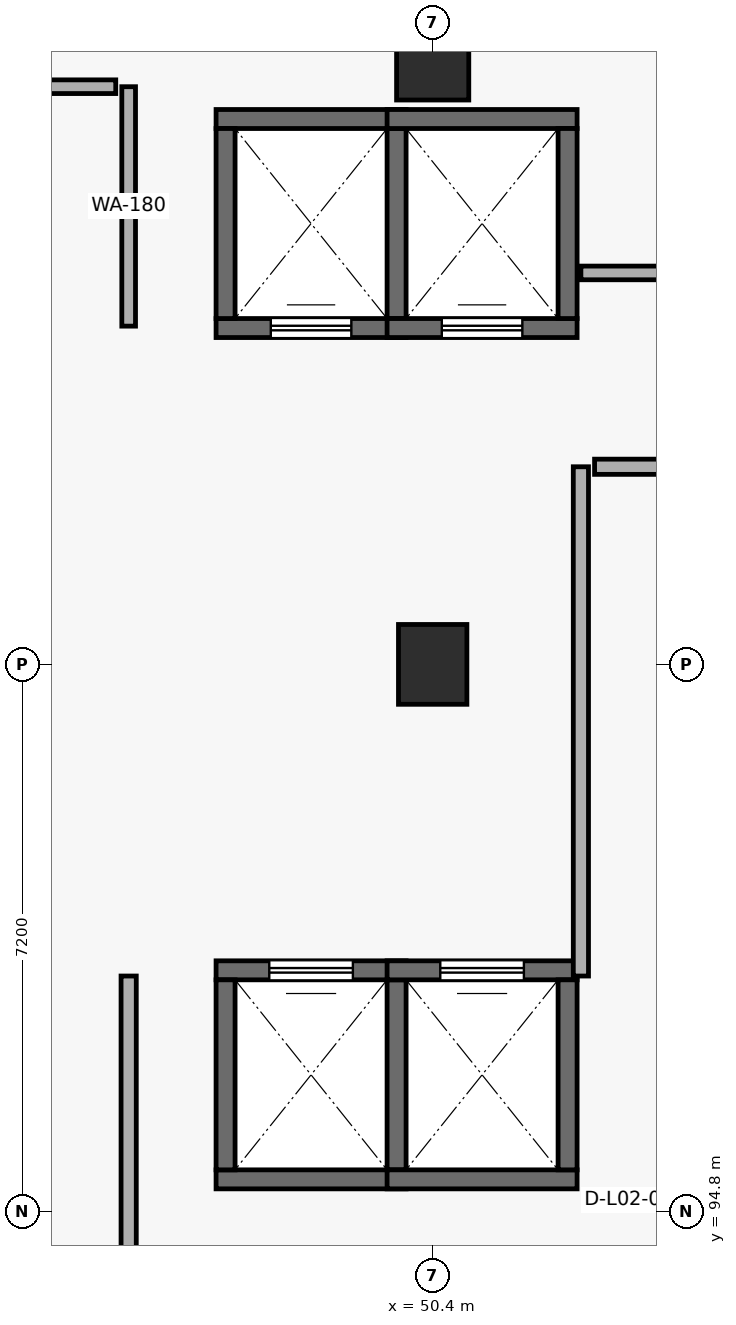
"""IFC4 building model, lengths in metres.
Left out: names, types, materials, properties, quantities, classifications, styles, units other than length and angle.
Written with IfcOpenShell. Run it as: python <this file> out.ifc"""

import sys

from ifc_helpers import new_model, si_unit, direction, frame, frame_2d, origin, origin_2d, place, context, subcontext, project, spatial, rectangle, extrude, element, fill, save


model = new_model("IFC4")
c1 = context("Model", 3, precision=1e-05, world=origin(), true_north=direction((0.0, 1.0)))
c2 = subcontext(c1, "Body", "Model", "MODEL_VIEW")
j1 = project(units=[si_unit("LENGTHUNIT", "METRE"), si_unit("PLANEANGLEUNIT", "RADIAN")], contexts=[c1])
p1 = place(None, origin())
s1 = spatial("IfcSite", under=j1, at=p1, CompositionType="ELEMENT")
p2 = place(p1, origin())
s2 = spatial("IfcBuilding", under=s1, at=p2, CompositionType="ELEMENT")
p3 = place(p2, frame((0.0, 0.0, 5.4)))
s3 = spatial("IfcBuildingStorey", under=s2, at=p3, CompositionType="ELEMENT", Elevation=5.4)
p4 = place(p3, frame((50.4, 102.0, 0.0), z_axis=(0.0, 0.0, 1.0), x_axis=(1.0, 0.0, 0.0)))
e1 = element("IfcColumn", 1, at=p4, inside=s3, PredefinedType="COLUMN", context=c2, shape_type="SweptSolid", body=[
    extrude(rectangle(XDim=0.9, YDim=1.05, at=origin_2d()), origin(), (0.0, 0.0, 1.0), 4.8),
])
p5 = place(p3, frame((50.4, 109.9, 0.0), z_axis=(0.0, 0.0, 1.0), x_axis=(1.0, 0.0, 0.0)))
e2 = element("IfcColumn", 2, at=p5, inside=s3, PredefinedType="COLUMN", context=c2, shape_type="SweptSolid", body=[
    extrude(rectangle(XDim=0.95, YDim=0.95, at=origin_2d()), origin(), (0.0, 0.0, 1.0), 4.8),
])
p6 = place(p3, frame((47.55, 95.225, 0.0), z_axis=(0.0, 0.0, 1.0), x_axis=(1.0, 0.0, 0.0)))
e3 = element("IfcWall", 3, at=p6, inside=s3, PredefinedType="SHEAR", context=c2, shape_type="SweptSolid", body=[
    extrude(rectangle(XDim=2.5, YDim=0.25, at=frame_2d((1.25, 0.0))), origin(), (0.0, 0.0, 1.0), 4.52),
])
p7 = place(p3, frame((50.05, 97.975, 0.0), z_axis=(0.0, 0.0, 1.0), x_axis=(-1.0, 0.0, 0.0)))
e4 = element("IfcWall", 4, at=p7, inside=s3, PredefinedType="SHEAR", context=c2, shape_type="SweptSolid", body=[
    extrude(rectangle(XDim=2.5, YDim=0.25, at=frame_2d((1.25, 0.0))), origin(), (0.0, 0.0, 1.0), 4.52),
])
p8 = place(p7, frame((0.7, 0.0, 0.0)))
e5 = element("IfcOpeningElement", 5, at=p8, cuts=e4, PredefinedType="OPENING", context=c2, shape_type="SweptSolid", body=[
    extrude(rectangle(XDim=1.1, YDim=2.2, at=frame_2d((0.55, 1.1))), frame((0.0, 0.135, 0.0), z_axis=(0.0, -1.0, 0.0), x_axis=(1.0, 0.0, 0.0)), (0.0, 0.0, 1.0), 0.27),
])
for number, where, z_axis, x_axis in (
    (6, (47.675, 95.35, 0.0), (0.0, 0.0, 1.0), (0.0, 1.0, 0.0)),
    (7, (49.925, 97.85, 0.0), (0.0, 0.0, 1.0), (0.0, -1.0, 0.0)),
    (8, (49.8, 95.225, 0.0), (0.0, 0.0, 1.0), (1.0, 0.0, 0.0)),
):
    element("IfcWall", number, at=place(p3, frame(where, z_axis=z_axis, x_axis=x_axis)), inside=s3, PredefinedType="SHEAR", context=c2, shape_type="SweptSolid", body=[
        extrude(rectangle(XDim=2.5, YDim=0.25, at=frame_2d((1.25, 0.0))), origin(), (0.0, 0.0, 1.0), 4.52),
    ])
p9 = place(p3, frame((52.3, 97.975, 0.0), z_axis=(0.0, 0.0, 1.0), x_axis=(-1.0, 0.0, 0.0)))
e9 = element("IfcWall", 9, at=p9, inside=s3, PredefinedType="SHEAR", context=c2, shape_type="SweptSolid", body=[
    extrude(rectangle(XDim=2.5, YDim=0.25, at=frame_2d((1.25, 0.0))), origin(), (0.0, 0.0, 1.0), 4.52),
])
p10 = place(p9, frame((0.7, 0.0, 0.0)))
e10 = element("IfcOpeningElement", 10, at=p10, cuts=e9, PredefinedType="OPENING", context=c2, shape_type="SweptSolid", body=[
    extrude(rectangle(XDim=1.1, YDim=2.2, at=frame_2d((0.55, 1.1))), frame((0.0, 0.135, 0.0), z_axis=(0.0, -1.0, 0.0), x_axis=(1.0, 0.0, 0.0)), (0.0, 0.0, 1.0), 0.27),
])
p11 = place(p3, frame((52.175, 97.85, 0.0), z_axis=(0.0, 0.0, 1.0), x_axis=(0.0, -1.0, 0.0)))
e11 = element("IfcWall", 11, at=p11, inside=s3, PredefinedType="SHEAR", context=c2, shape_type="SweptSolid", body=[
    extrude(rectangle(XDim=2.5, YDim=0.25, at=frame_2d((1.25, 0.0))), origin(), (0.0, 0.0, 1.0), 4.52),
])
p12 = place(p3, frame((47.55, 106.425, 0.0), z_axis=(0.0, 0.0, 1.0), x_axis=(1.0, 0.0, 0.0)))
e12 = element("IfcWall", 12, at=p12, inside=s3, PredefinedType="SHEAR", context=c2, shape_type="SweptSolid", body=[
    extrude(rectangle(XDim=2.5, YDim=0.25, at=frame_2d((1.25, 0.0))), origin(), (0.0, 0.0, 1.0), 4.52),
])
p13 = place(p12, frame((0.72, 0.0, 0.0)))
e13 = element("IfcOpeningElement", 13, at=p13, cuts=e12, PredefinedType="OPENING", context=c2, shape_type="SweptSolid", body=[
    extrude(rectangle(XDim=1.06, YDim=2.2, at=frame_2d((0.53, 1.1))), frame((0.0, 0.135, 0.0), z_axis=(0.0, -1.0, 0.0), x_axis=(1.0, 0.0, 0.0)), (0.0, 0.0, 1.0), 0.27),
])
for number, where, z_axis, x_axis in (
    (14, (50.05, 109.175, 0.0), (0.0, 0.0, 1.0), (-1.0, 0.0, 0.0)),
    (15, (47.675, 106.55, 0.0), (0.0, 0.0, 1.0), (0.0, 1.0, 0.0)),
    (16, (49.925, 109.05, 0.0), (0.0, 0.0, 1.0), (0.0, -1.0, 0.0)),
):
    element("IfcWall", number, at=place(p3, frame(where, z_axis=z_axis, x_axis=x_axis)), inside=s3, PredefinedType="SHEAR", context=c2, shape_type="SweptSolid", body=[
        extrude(rectangle(XDim=2.5, YDim=0.25, at=frame_2d((1.25, 0.0))), origin(), (0.0, 0.0, 1.0), 4.52),
    ])
p14 = place(p3, frame((49.8, 106.425, 0.0), z_axis=(0.0, 0.0, 1.0), x_axis=(1.0, 0.0, 0.0)))
e17 = element("IfcWall", 17, at=p14, inside=s3, PredefinedType="SHEAR", context=c2, shape_type="SweptSolid", body=[
    extrude(rectangle(XDim=2.5, YDim=0.25, at=frame_2d((1.25, 0.0))), origin(), (0.0, 0.0, 1.0), 4.52),
])
p15 = place(p14, frame((0.72, 0.0, 0.0)))
e18 = element("IfcOpeningElement", 18, at=p15, cuts=e17, PredefinedType="OPENING", context=c2, shape_type="SweptSolid", body=[
    extrude(rectangle(XDim=1.06, YDim=2.2, at=frame_2d((0.53, 1.1))), frame((0.0, 0.135, 0.0), z_axis=(0.0, -1.0, 0.0), x_axis=(1.0, 0.0, 0.0)), (0.0, 0.0, 1.0), 0.27),
])
for number, where, z_axis, x_axis in (
    (19, (52.3, 109.175, 0.0), (0.0, 0.0, 1.0), (-1.0, 0.0, 0.0)),
    (20, (52.175, 109.05, 0.0), (0.0, 0.0, 1.0), (0.0, -1.0, 0.0)),
):
    element("IfcWall", number, at=place(p3, frame(where, z_axis=z_axis, x_axis=x_axis)), inside=s3, PredefinedType="SHEAR", context=c2, shape_type="SweptSolid", body=[
        extrude(rectangle(XDim=2.5, YDim=0.25, at=frame_2d((1.25, 0.0))), origin(), (0.0, 0.0, 1.0), 4.52),
    ])
p16 = place(p3, frame((64.35, 107.15, 0.0), z_axis=(0.0, 0.0, 1.0), x_axis=(-1.0, 0.0, 0.0)))
e21 = element("IfcWall", 21, at=p16, inside=s3, PredefinedType="PARTITIONING", context=c2, shape_type="SweptSolid", body=[
    extrude(rectangle(XDim=12.0, YDim=0.18, at=frame_2d((6.0, 0.0))), origin(), (0.0, 0.0, 1.0), 4.52),
])
p17 = place(p3, frame((52.35, 97.9, 0.0), z_axis=(0.0, 0.0, 1.0), x_axis=(0.0, 1.0, 0.0)))
e22 = element("IfcWall", 22, at=p17, inside=s3, PredefinedType="PARTITIONING", context=c2, shape_type="SweptSolid", body=[
    extrude(rectangle(XDim=6.7, YDim=0.2, at=frame_2d((3.35, 0.0))), origin(), (0.0, 0.0, 1.0), 4.52),
])
p18 = place(p3, frame((46.4, 94.03, 0.0), z_axis=(0.0, 0.0, 1.0), x_axis=(0.0, 1.0, 0.0)))
e23 = element("IfcWall", 23, at=p18, inside=s3, PredefinedType="PARTITIONING", context=c2, shape_type="SweptSolid", body=[
    extrude(rectangle(XDim=3.87, YDim=0.2, at=frame_2d((1.935, 0.0))), origin(), (0.0, 0.0, 1.0), 4.52),
])
p19 = place(p3, frame((46.4, 106.45, 0.0), z_axis=(0.0, 0.0, 1.0), x_axis=(0.0, 1.0, 0.0)))
e24 = element("IfcWall", 24, at=p19, inside=s3, PredefinedType="PARTITIONING", context=c2, shape_type="SweptSolid", body=[
    extrude(rectangle(XDim=3.15, YDim=0.18, at=frame_2d((1.575, 0.0))), origin(), (0.0, 0.0, 1.0), 4.52),
])
p20 = place(p3, frame((52.53, 104.6, 0.0), z_axis=(0.0, 0.0, 1.0), x_axis=(1.0, 0.0, 0.0)))
e25 = element("IfcWall", 25, at=p20, inside=s3, PredefinedType="PARTITIONING", context=c2, shape_type="SweptSolid", body=[
    extrude(rectangle(XDim=2.55, YDim=0.2, at=frame_2d((1.275, 0.0))), origin(), (0.0, 0.0, 1.0), 4.52),
])
p21 = place(p3, frame((46.23, 109.6, 0.0), z_axis=(0.0, 0.0, 1.0), x_axis=(-1.0, 0.0, 0.0)))
e26 = element("IfcWall", 26, at=p21, inside=s3, PredefinedType="PARTITIONING", context=c2, shape_type="SweptSolid", body=[
    extrude(rectangle(XDim=1.895, YDim=0.18, at=frame_2d((0.948, 0.0))), origin(), (0.0, 0.0, 1.0), 3.6),
])
p22 = place(p8, origin())
e27 = element("IfcDoor", 27, at=p22, inside=s3, OperationType="SLIDING_TO_LEFT", PredefinedType="DOOR", context=c2, shape_type="SweptSolid", body=[
    extrude(rectangle(XDim=1.1, YDim=2.2, at=frame_2d((0.55, 1.1))), frame((0.0, 0.025, 0.0), z_axis=(0.0, -1.0, 0.0), x_axis=(1.0, 0.0, 0.0)), (0.0, 0.0, 1.0), 0.05),
])
fill(e5, e27)
p23 = place(p10, origin())
e28 = element("IfcDoor", 28, at=p23, inside=s3, OperationType="SLIDING_TO_LEFT", PredefinedType="DOOR", context=c2, shape_type="SweptSolid", body=[
    extrude(rectangle(XDim=1.1, YDim=2.2, at=frame_2d((0.55, 1.1))), frame((0.0, 0.025, 0.0), z_axis=(0.0, -1.0, 0.0), x_axis=(1.0, 0.0, 0.0)), (0.0, 0.0, 1.0), 0.05),
])
fill(e10, e28)
p24 = place(p13, origin())
e29 = element("IfcDoor", 29, at=p24, inside=s3, OperationType="SLIDING_TO_LEFT", PredefinedType="DOOR", context=c2, shape_type="SweptSolid", body=[
    extrude(rectangle(XDim=1.06, YDim=2.2, at=frame_2d((0.53, 1.1))), frame((0.0, 0.025, 0.0), z_axis=(0.0, -1.0, 0.0), x_axis=(1.0, 0.0, 0.0)), (0.0, 0.0, 1.0), 0.05),
])
fill(e13, e29)
p25 = place(p15, origin())
e30 = element("IfcDoor", 30, at=p25, inside=s3, OperationType="SLIDING_TO_LEFT", PredefinedType="DOOR", context=c2, shape_type="SweptSolid", body=[
    extrude(rectangle(XDim=1.06, YDim=2.2, at=frame_2d((0.53, 1.1))), frame((0.0, 0.025, 0.0), z_axis=(0.0, -1.0, 0.0), x_axis=(1.0, 0.0, 0.0)), (0.0, 0.0, 1.0), 0.05),
])
fill(e18, e30)
save(model, sys.argv[1])
